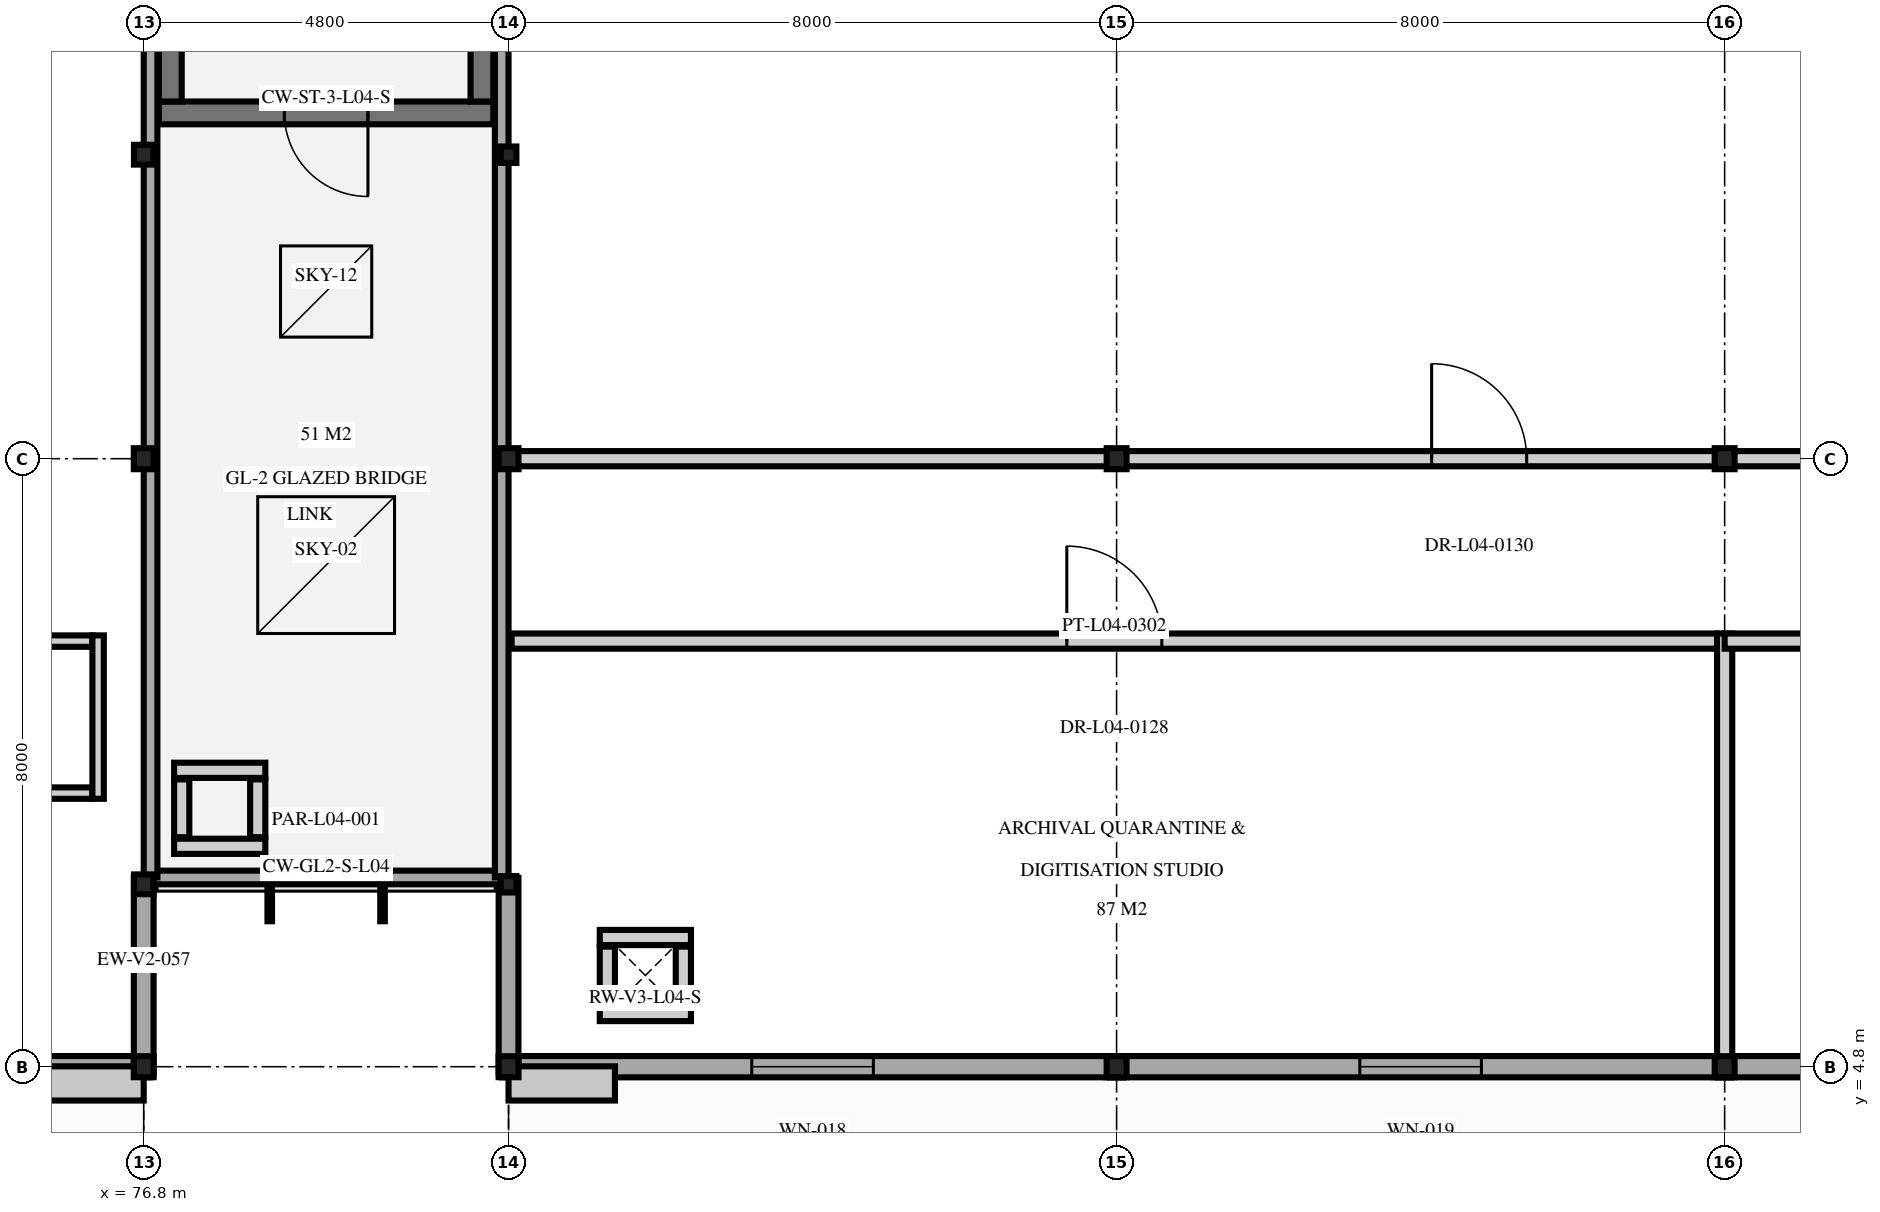
"""IFC4 building model, lengths in metres.
Left out: names, types, materials, properties, quantities, classifications, styles, units other than length and angle.
Written with IfcOpenShell. Run it as: python <this file> out.ifc"""

import sys

from ifc_helpers import new_model, si_unit, direction, frame, frame_2d, origin, origin_2d, place, context, subcontext, project, spatial, rectangle, i_section, extrude, element, fill, save


model = new_model("IFC4")
c1 = context("Model", 3, precision=1e-05, world=origin(), true_north=direction((0.0, 1.0)))
c2 = subcontext(c1, "Body", "Model", "MODEL_VIEW")
j1 = project(units=[si_unit("LENGTHUNIT", "METRE"), si_unit("PLANEANGLEUNIT", "RADIAN")], contexts=[c1])
p1 = place(None, origin())
s1 = spatial("IfcSite", under=j1, at=p1, CompositionType="ELEMENT")
p2 = place(p1, origin())
s2 = spatial("IfcBuilding", under=s1, at=p2, CompositionType="ELEMENT")
p3 = place(p2, frame((0.0, 0.0, 18.6)))
s3 = spatial("IfcBuildingStorey", under=s2, at=p3, CompositionType="ELEMENT", Elevation=18.6)
for number, where, z_axis, x_axis in (
    (1, (76.8, 4.8, 0.0), (0.0, 0.0, 1.0), (1.0, 0.0, 0.0)),
    (2, (76.8, 12.8, 0.0), (0.0, 0.0, 1.0), (1.0, 0.0, 0.0)),
):
    element("IfcColumn", number, at=place(p3, frame(where, z_axis=z_axis, x_axis=x_axis)), inside=s3, PredefinedType="COLUMN", context=c2, shape_type="SweptSolid", body=[
        extrude(i_section(OverallWidth=0.261, OverallDepth=0.276, WebThickness=0.015, FlangeThickness=0.025, at=origin_2d()), origin(), (0.0, 0.0, 1.0), 4.5),
    ])
for number, where, z_axis, x_axis in (
    (3, (76.8, 7.2, 0.0), (0.0, 0.0, 1.0), (1.0, 0.0, 0.0)),
    (4, (76.8, 16.8, 0.0), (0.0, 0.0, 1.0), (1.0, 0.0, 0.0)),
):
    element("IfcColumn", number, at=place(p3, frame(where, z_axis=z_axis, x_axis=x_axis)), inside=s3, PredefinedType="COLUMN", context=c2, shape_type="SweptSolid", body=[
        extrude(i_section(OverallWidth=0.256, OverallDepth=0.26, WebThickness=0.01, FlangeThickness=0.017, at=origin_2d()), origin(), (0.0, 0.0, 1.0), 4.5),
    ])
for number, where, z_axis, x_axis in (
    (5, (81.6, 4.8, 0.0), (0.0, 0.0, 1.0), (1.0, 0.0, 0.0)),
    (6, (81.6, 12.8, 0.0), (0.0, 0.0, 1.0), (1.0, 0.0, 0.0)),
):
    element("IfcColumn", number, at=place(p3, frame(where, z_axis=z_axis, x_axis=x_axis)), inside=s3, PredefinedType="COLUMN", context=c2, shape_type="SweptSolid", body=[
        extrude(i_section(OverallWidth=0.261, OverallDepth=0.276, WebThickness=0.015, FlangeThickness=0.025, at=origin_2d()), origin(), (0.0, 0.0, 1.0), 3.795),
    ])
for number, where, z_axis, x_axis in (
    (7, (89.6, 4.8, 0.0), (0.0, 0.0, 1.0), (1.0, 0.0, 0.0)),
    (8, (89.6, 12.8, 0.0), (0.0, 0.0, 1.0), (1.0, 0.0, 0.0)),
    (9, (97.6, 4.8, 0.0), (0.0, 0.0, 1.0), (1.0, 0.0, 0.0)),
    (10, (97.6, 12.8, 0.0), (0.0, 0.0, 1.0), (1.0, 0.0, 0.0)),
):
    element("IfcColumn", number, at=place(p3, frame(where, z_axis=z_axis, x_axis=x_axis)), inside=s3, PredefinedType="COLUMN", context=c2, shape_type="SweptSolid", body=[
        extrude(i_section(OverallWidth=0.261, OverallDepth=0.276, WebThickness=0.015, FlangeThickness=0.025, at=origin_2d()), origin(), (0.0, 0.0, 1.0), 4.5),
    ])
for number, where, z_axis, x_axis in (
    (11, (81.6, 7.2, 0.0), (0.0, 0.0, 1.0), (1.0, 0.0, 0.0)),
    (12, (81.6, 16.8, 0.0), (0.0, 0.0, 1.0), (1.0, 0.0, 0.0)),
):
    element("IfcColumn", number, at=place(p3, frame(where, z_axis=z_axis, x_axis=x_axis)), inside=s3, PredefinedType="COLUMN", context=c2, shape_type="SweptSolid", body=[
        extrude(i_section(OverallWidth=0.206, OverallDepth=0.216, WebThickness=0.01, FlangeThickness=0.017, at=origin_2d()), origin(), (0.0, 0.0, 1.0), 3.795),
    ])
p4 = place(p3, frame((81.4, 17.35, 0.0), z_axis=(0.0, 0.0, 1.0), x_axis=(-1.0, 0.0, 0.0)))
e13 = element("IfcWall", 13, at=p4, inside=s3, PredefinedType="SHEAR", context=c2, shape_type="SweptSolid", body=[
    extrude(rectangle(XDim=4.4, YDim=0.3, at=frame_2d((2.2, 0.0))), origin(), (0.0, 0.0, 1.0), 2.605),
])
p5 = place(p4, frame((1.65, 0.0, 0.0)))
e14 = element("IfcOpeningElement", 14, at=p5, cuts=e13, PredefinedType="OPENING", context=c2, shape_type="SweptSolid", body=[
    extrude(rectangle(XDim=1.1, YDim=2.2, at=frame_2d((0.55, 1.1))), frame((0.0, 0.16, 0.0), z_axis=(0.0, -1.0, 0.0), x_axis=(1.0, 0.0, 0.0)), (0.0, 0.0, 1.0), 0.32),
])
for number, where, z_axis, x_axis in (
    (15, (77.15, 17.5, 0.0), (0.0, 0.0, 1.0), (0.0, 1.0, 0.0)),
    (16, (81.25, 25.3, 0.0), (0.0, 0.0, 1.0), (0.0, -1.0, 0.0)),
):
    element("IfcWall", number, at=place(p3, frame(where, z_axis=z_axis, x_axis=x_axis)), inside=s3, PredefinedType="SHEAR", context=c2, shape_type="SweptSolid", body=[
        extrude(rectangle(XDim=7.8, YDim=0.3, at=frame_2d((3.9, 0.0))), origin(), (0.0, 0.0, 1.0), 2.605),
    ])
for number, where, z_axis, x_axis in (
    (17, (84.0, 5.5, 0.0), (0.0, 0.0, 1.0), (-1.0, 0.0, 0.0)),
    (18, (82.8, 6.5, 0.0), (0.0, 0.0, 1.0), (1.0, 0.0, 0.0)),
):
    element("IfcWall", number, at=place(p3, frame(where, z_axis=z_axis, x_axis=x_axis)), inside=s3, PredefinedType="PARTITIONING", context=c2, shape_type="SweptSolid", body=[
        extrude(rectangle(XDim=1.2, YDim=0.2, at=frame_2d((0.6, 0.0))), origin(), (0.0, 0.0, 1.0), 4.061),
    ])
for number, where, z_axis, x_axis in (
    (19, (82.9, 5.62, 0.0), (0.0, 0.0, 1.0), (0.0, 1.0, 0.0)),
    (20, (83.9, 6.38, 0.0), (0.0, 0.0, 1.0), (0.0, -1.0, 0.0)),
):
    element("IfcWall", number, at=place(p3, frame(where, z_axis=z_axis, x_axis=x_axis)), inside=s3, PredefinedType="PARTITIONING", context=c2, shape_type="SweptSolid", body=[
        extrude(rectangle(XDim=0.76, YDim=0.2, at=frame_2d((0.38, 0.0))), origin(), (0.0, 0.0, 1.0), 4.061),
    ])
for number, where, z_axis, x_axis in (
    (21, (78.4, 7.7, 0.0), (0.0, 0.0, 1.0), (-1.0, 0.0, 0.0)),
    (22, (77.2, 8.7, 0.0), (0.0, 0.0, 1.0), (1.0, 0.0, 0.0)),
):
    element("IfcWall", number, at=place(p3, frame(where, z_axis=z_axis, x_axis=x_axis)), inside=s3, PredefinedType="PARTITIONING", context=c2, shape_type="SweptSolid", body=[
        extrude(rectangle(XDim=1.2, YDim=0.2, at=frame_2d((0.6, 0.0))), origin(), (0.0, 0.0, 1.0), 2.105),
    ])
for number, where, z_axis, x_axis in (
    (23, (77.3, 7.82, 0.0), (0.0, 0.0, 1.0), (0.0, 1.0, 0.0)),
    (24, (78.3, 8.58, 0.0), (0.0, 0.0, 1.0), (0.0, -1.0, 0.0)),
):
    element("IfcWall", number, at=place(p3, frame(where, z_axis=z_axis, x_axis=x_axis)), inside=s3, PredefinedType="PARTITIONING", context=c2, shape_type="SweptSolid", body=[
        extrude(rectangle(XDim=0.76, YDim=0.2, at=frame_2d((0.38, 0.0))), origin(), (0.0, 0.0, 1.0), 2.105),
    ])
p6 = place(p3, frame((76.885, 4.8, 0.0), z_axis=(0.0, 0.0, 1.0), x_axis=(-1.0, 0.0, 0.0)))
e25 = element("IfcWall", 25, at=p6, inside=s3, PredefinedType="SOLIDWALL", context=c2, shape_type="SweptSolid", body=[
    extrude(rectangle(XDim=9.77, YDim=0.28, at=frame_2d((4.885, 0.0))), origin(), (0.0, 0.0, 1.0), 3.855),
])
p7 = place(p6, frame((3.685, 0.0, 0.95)))
e26 = element("IfcOpeningElement", 26, at=p7, cuts=e25, PredefinedType="OPENING", context=c2, shape_type="SweptSolid", body=[
    extrude(rectangle(XDim=2.4, YDim=2.1, at=frame_2d((1.2, 1.05))), frame((0.0, 0.15, 0.0), z_axis=(0.0, -1.0, 0.0), x_axis=(1.0, 0.0, 0.0)), (0.0, 0.0, 1.0), 0.3),
])
p8 = place(p3, frame((76.8, 7.285, 0.0), z_axis=(0.0, 0.0, 1.0), x_axis=(0.0, -1.0, 0.0)))
e27 = element("IfcWall", 27, at=p8, inside=s3, PredefinedType="SOLIDWALL", context=c2, shape_type="SweptSolid", body=[
    extrude(rectangle(XDim=2.57, YDim=0.26, at=frame_2d((1.285, 0.0))), origin(), (0.0, 0.0, 1.0), 3.855),
])
p9 = place(p3, frame((89.685, 4.8, 0.0), z_axis=(0.0, 0.0, 1.0), x_axis=(-1.0, 0.0, 0.0)))
e28 = element("IfcWall", 28, at=p9, inside=s3, PredefinedType="SOLIDWALL", context=c2, shape_type="SweptSolid", body=[
    extrude(rectangle(XDim=8.17, YDim=0.28, at=frame_2d((4.085, 0.0))), origin(), (0.0, 0.0, 1.0), 3.471),
])
p10 = place(p9, frame((3.285, 0.0, 1.1)))
e29 = element("IfcOpeningElement", 29, at=p10, cuts=e28, PredefinedType="OPENING", context=c2, shape_type="SweptSolid", body=[
    extrude(rectangle(XDim=1.6, YDim=1.8, at=frame_2d((0.8, 0.9))), frame((0.0, 0.15, 0.0), z_axis=(0.0, -1.0, 0.0), x_axis=(1.0, 0.0, 0.0)), (0.0, 0.0, 1.0), 0.3),
])
p11 = place(p3, frame((97.685, 4.8, 0.0), z_axis=(0.0, 0.0, 1.0), x_axis=(-1.0, 0.0, 0.0)))
e30 = element("IfcWall", 30, at=p11, inside=s3, PredefinedType="SOLIDWALL", context=c2, shape_type="SweptSolid", body=[
    extrude(rectangle(XDim=8.17, YDim=0.28, at=frame_2d((4.085, 0.0))), origin(), (0.0, 0.0, 1.0), 3.471),
])
p12 = place(p11, frame((3.285, 0.0, 1.1)))
e31 = element("IfcOpeningElement", 31, at=p12, cuts=e30, PredefinedType="OPENING", context=c2, shape_type="SweptSolid", body=[
    extrude(rectangle(XDim=1.6, YDim=1.8, at=frame_2d((0.8, 0.9))), frame((0.0, 0.15, 0.0), z_axis=(0.0, -1.0, 0.0), x_axis=(1.0, 0.0, 0.0)), (0.0, 0.0, 1.0), 0.3),
])
p13 = place(p3, frame((107.285, 4.8, 0.0), z_axis=(0.0, 0.0, 1.0), x_axis=(-1.0, 0.0, 0.0)))
e32 = element("IfcWall", 32, at=p13, inside=s3, PredefinedType="SOLIDWALL", context=c2, shape_type="SweptSolid", body=[
    extrude(rectangle(XDim=9.77, YDim=0.28, at=frame_2d((4.885, 0.0))), origin(), (0.0, 0.0, 1.0), 5.249),
])
p14 = place(p13, frame((4.085, 0.0, 1.1)))
e33 = element("IfcOpeningElement", 33, at=p14, cuts=e32, PredefinedType="OPENING", context=c2, shape_type="SweptSolid", body=[
    extrude(rectangle(XDim=1.6, YDim=1.8, at=frame_2d((0.8, 0.9))), frame((0.0, 0.15, 0.0), z_axis=(0.0, -1.0, 0.0), x_axis=(1.0, 0.0, 0.0)), (0.0, 0.0, 1.0), 0.3),
])
p15 = place(p3, frame((81.6, 4.715, 0.0), z_axis=(0.0, 0.0, 1.0), x_axis=(0.0, 1.0, 0.0)))
e34 = element("IfcWall", 34, at=p15, inside=s3, PredefinedType="SOLIDWALL", context=c2, shape_type="SweptSolid", body=[
    extrude(rectangle(XDim=2.57, YDim=0.26, at=frame_2d((1.285, 0.0))), origin(), (0.0, 0.0, 1.0), 3.471),
])
p16 = place(p3, frame((81.51, 7.29, 2.85), z_axis=(0.0, 0.0, 1.0), x_axis=(-1.0, 0.0, 0.0)))
e35 = element("IfcWall", 35, at=p16, inside=s3, PredefinedType="PARAPET", context=c2, shape_type="SweptSolid", body=[
    extrude(rectangle(XDim=4.62, YDim=0.18, at=frame_2d((2.31, 0.0))), origin(), (0.0, 0.0, 1.0), 0.45),
])
for number, where, z_axis, x_axis in (
    (36, (76.89, 7.29, 2.85), (0.0, 0.0, 1.0), (0.0, 1.0, 0.0)),
    (37, (81.51, 25.51, 2.85), (0.0, 0.0, 1.0), (0.0, -1.0, 0.0)),
):
    element("IfcWall", number, at=place(p3, frame(where, z_axis=z_axis, x_axis=x_axis)), inside=s3, PredefinedType="PARAPET", context=c2, shape_type="SweptSolid", body=[
        extrude(rectangle(XDim=18.22, YDim=0.18, at=frame_2d((9.11, 0.0))), origin(), (0.0, 0.0, 1.0), 0.45),
    ])
p17 = place(p3, frame((68.675, 8.4, 0.0), z_axis=(0.0, 0.0, 1.0), x_axis=(1.0, 0.0, 0.0)))
e38 = element("IfcWall", 38, at=p17, inside=s3, PredefinedType="PARTITIONING", context=c2, shape_type="SweptSolid", body=[
    extrude(rectangle(XDim=7.45, YDim=0.15, at=frame_2d((3.725, 0.0))), origin(), (0.0, 0.0, 1.0), 4.025),
])
p18 = place(p3, frame((68.675, 10.4, 0.0), z_axis=(0.0, 0.0, 1.0), x_axis=(1.0, 0.0, 0.0)))
e39 = element("IfcWall", 39, at=p18, inside=s3, PredefinedType="PARTITIONING", context=c2, shape_type="SweptSolid", body=[
    extrude(rectangle(XDim=7.45, YDim=0.15, at=frame_2d((3.725, 0.0))), origin(), (0.0, 0.0, 1.0), 4.025),
])
p19 = place(p18, frame((3.25, 0.0, 0.0)))
e40 = element("IfcOpeningElement", 40, at=p19, cuts=e39, PredefinedType="OPENING", context=c2, shape_type="SweptSolid", body=[
    extrude(rectangle(XDim=0.95, YDim=2.15, at=frame_2d((0.475, 1.075))), frame((0.0, 0.085, 0.0), z_axis=(0.0, -1.0, 0.0), x_axis=(1.0, 0.0, 0.0)), (0.0, 0.0, 1.0), 0.17),
])
p20 = place(p3, frame((76.2, 8.325, 0.0), z_axis=(0.0, 0.0, 1.0), x_axis=(0.0, 1.0, 0.0)))
e41 = element("IfcWall", 41, at=p20, inside=s3, PredefinedType="PARTITIONING", context=c2, shape_type="SweptSolid", body=[
    extrude(rectangle(XDim=2.15, YDim=0.15, at=frame_2d((1.075, 0.0))), origin(), (0.0, 0.0, 1.0), 4.28),
])
p21 = place(p3, frame((81.64, 10.4, 0.0), z_axis=(0.0, 0.0, 1.0), x_axis=(1.0, 0.0, 0.0)))
e42 = element("IfcWall", 42, at=p21, inside=s3, PredefinedType="PARTITIONING", context=c2, shape_type="SweptSolid", body=[
    extrude(rectangle(XDim=15.86, YDim=0.2, at=frame_2d((7.93, 0.0))), origin(), (0.0, 0.0, 1.0), 4.242),
])
p22 = place(p21, frame((7.305, 0.0, 0.0)))
e43 = element("IfcOpeningElement", 43, at=p22, cuts=e42, PredefinedType="OPENING", context=c2, shape_type="SweptSolid", body=[
    extrude(rectangle(XDim=1.25, YDim=2.25, at=frame_2d((0.625, 1.125))), frame((0.0, 0.11, 0.0), z_axis=(0.0, -1.0, 0.0), x_axis=(1.0, 0.0, 0.0)), (0.0, 0.0, 1.0), 0.22),
])
p23 = place(p3, frame((97.6, 4.84, 0.0), z_axis=(0.0, 0.0, 1.0), x_axis=(0.0, 1.0, 0.0)))
e44 = element("IfcWall", 44, at=p23, inside=s3, PredefinedType="PARTITIONING", context=c2, shape_type="SweptSolid", body=[
    extrude(rectangle(XDim=5.66, YDim=0.2, at=frame_2d((2.83, 0.0))), origin(), (0.0, 0.0, 1.0), 5.249),
])
p24 = place(p3, frame((97.6, 10.4, 0.0), z_axis=(0.0, 0.0, 1.0), x_axis=(1.0, 0.0, 0.0)))
e45 = element("IfcWall", 45, at=p24, inside=s3, PredefinedType="PARTITIONING", context=c2, shape_type="SweptSolid", body=[
    extrude(rectangle(XDim=14.6, YDim=0.2, at=frame_2d((7.3, 0.0))), origin(), (0.0, 0.0, 1.0), 7.531),
])
p25 = place(p24, frame((6.8, 0.0, 0.0)))
e46 = element("IfcOpeningElement", 46, at=p25, cuts=e45, PredefinedType="OPENING", context=c2, shape_type="SweptSolid", body=[
    extrude(rectangle(XDim=1.0, YDim=2.2, at=frame_2d((0.5, 1.1))), frame((0.0, 0.11, 0.0), z_axis=(0.0, -1.0, 0.0), x_axis=(1.0, 0.0, 0.0)), (0.0, 0.0, 1.0), 0.22),
])
p26 = place(p3, frame((81.64, 12.8, 0.0), z_axis=(0.0, 0.0, 1.0), x_axis=(1.0, 0.0, 0.0)))
e47 = element("IfcWall", 47, at=p26, inside=s3, PredefinedType="PARTITIONING", context=c2, shape_type="SweptSolid", body=[
    extrude(rectangle(XDim=25.46, YDim=0.2, at=frame_2d((12.73, 0.0))), origin(), (0.0, 0.0, 1.0), 3.471),
])
p27 = place(p26, frame((12.105, 0.0, 0.0)))
e48 = element("IfcOpeningElement", 48, at=p27, cuts=e47, PredefinedType="OPENING", context=c2, shape_type="SweptSolid", body=[
    extrude(rectangle(XDim=1.25, YDim=2.25, at=frame_2d((0.625, 1.125))), frame((0.0, 0.11, 0.0), z_axis=(0.0, -1.0, 0.0), x_axis=(1.0, 0.0, 0.0)), (0.0, 0.0, 1.0), 0.22),
])
p28 = place(p5, origin())
e49 = element("IfcDoor", 49, at=p28, inside=s3, OperationType="SINGLE_SWING_LEFT", PredefinedType="DOOR", context=c2, shape_type="SweptSolid", body=[
    extrude(rectangle(XDim=1.1, YDim=2.2, at=frame_2d((0.55, 1.1))), frame((0.0, 0.025, 0.0), z_axis=(0.0, -1.0, 0.0), x_axis=(1.0, 0.0, 0.0)), (0.0, 0.0, 1.0), 0.05),
])
fill(e14, e49)
p29 = place(p10, origin())
e50 = element("IfcWindow", 50, at=p29, inside=s3, PartitioningType="SINGLE_PANEL", PredefinedType="WINDOW", context=c2, shape_type="SweptSolid", body=[
    extrude(rectangle(XDim=1.6, YDim=1.8, at=frame_2d((0.8, 0.9))), frame((0.0, 0.03, 0.0), z_axis=(0.0, -1.0, 0.0), x_axis=(1.0, 0.0, 0.0)), (0.0, 0.0, 1.0), 0.06),
])
fill(e29, e50)
p30 = place(p12, origin())
e51 = element("IfcWindow", 51, at=p30, inside=s3, PartitioningType="SINGLE_PANEL", PredefinedType="WINDOW", context=c2, shape_type="SweptSolid", body=[
    extrude(rectangle(XDim=1.6, YDim=1.8, at=frame_2d((0.8, 0.9))), frame((0.0, 0.03, 0.0), z_axis=(0.0, -1.0, 0.0), x_axis=(1.0, 0.0, 0.0)), (0.0, 0.0, 1.0), 0.06),
])
fill(e31, e51)
p31 = place(p3, frame((0.0, 0.0, 2.6)))
p32 = place(p31, frame((79.2, 11.4, 0.2)))
e52 = element("IfcWindow", 52, at=p32, inside=s3, PartitioningType="SINGLE_PANEL", PredefinedType="SKYLIGHT", context=c2, shape_type="SweptSolid", body=[
    extrude(rectangle(XDim=1.8, YDim=1.8, at=origin_2d()), origin(), (0.0, 0.0, 1.0), 0.05),
])
p33 = place(p31, frame((79.2, 15.0, 0.2)))
e53 = element("IfcWindow", 53, at=p33, inside=s3, PartitioningType="SINGLE_PANEL", PredefinedType="SKYLIGHT", context=c2, shape_type="SweptSolid", body=[
    extrude(rectangle(XDim=1.2, YDim=1.2, at=origin_2d()), origin(), (0.0, 0.0, 1.0), 0.05),
])
p34 = place(p22, origin())
e54 = element("IfcDoor", 54, at=p34, inside=s3, OperationType="SINGLE_SWING_LEFT", PredefinedType="DOOR", context=c2, shape_type="SweptSolid", body=[
    extrude(rectangle(XDim=1.25, YDim=2.25, at=frame_2d((0.625, 1.125))), frame((0.0, 0.025, 0.0), z_axis=(0.0, -1.0, 0.0), x_axis=(1.0, 0.0, 0.0)), (0.0, 0.0, 1.0), 0.05),
])
fill(e43, e54)
p35 = place(p27, origin())
e55 = element("IfcDoor", 55, at=p35, inside=s3, OperationType="SINGLE_SWING_LEFT", PredefinedType="DOOR", context=c2, shape_type="SweptSolid", body=[
    extrude(rectangle(XDim=1.25, YDim=2.25, at=frame_2d((0.625, 1.125))), frame((0.0, 0.025, 0.0), z_axis=(0.0, -1.0, 0.0), x_axis=(1.0, 0.0, 0.0)), (0.0, 0.0, 1.0), 0.05),
])
fill(e48, e55)
save(model, sys.argv[1])
